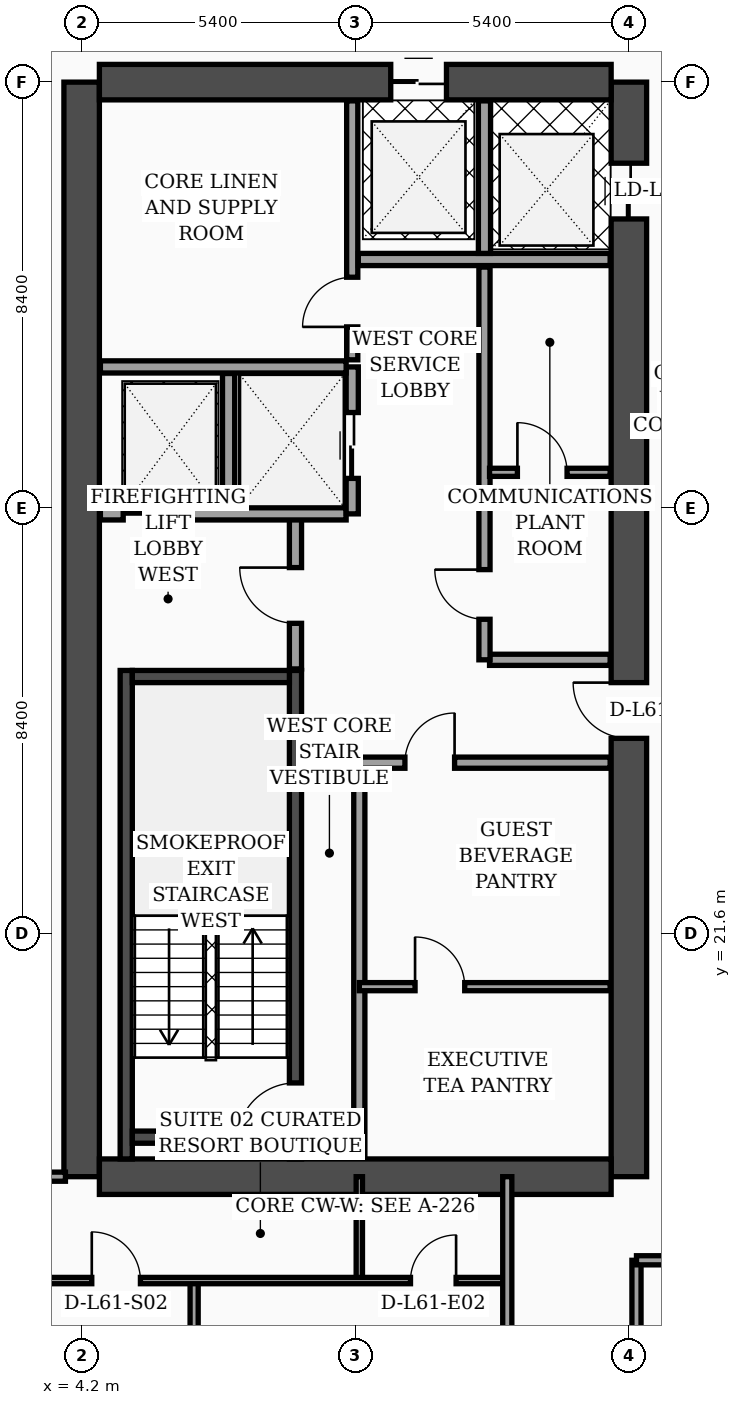
"""IFC4 building model, lengths in metres.
Left out: names, types, materials, properties, quantities, classifications, styles, units other than length and angle.
Written with IfcOpenShell. Run it as: python <this file> out.ifc"""

import sys

from ifc_helpers import new_model, si_unit, direction, frame, frame_2d, origin, place, context, subcontext, project, spatial, rectangle, extrude, element, fill, save


model = new_model("IFC4")
c1 = context("Model", 3, precision=1e-05, world=origin(), true_north=direction((0.0, 1.0)))
c2 = subcontext(c1, "Body", "Model", "MODEL_VIEW")
j1 = project(units=[si_unit("LENGTHUNIT", "METRE"), si_unit("PLANEANGLEUNIT", "RADIAN")], contexts=[c1])
p1 = place(None, origin())
s1 = spatial("IfcSite", under=j1, at=p1, CompositionType="ELEMENT")
p2 = place(p1, origin())
s2 = spatial("IfcBuilding", under=s1, at=p2, CompositionType="ELEMENT")
p3 = place(p2, frame((0.0, 0.0, 247.6)))
s3 = spatial("IfcBuildingStorey", under=s2, at=p3, CompositionType="ELEMENT", Elevation=247.6)
p4 = place(p3, frame((4.2, 16.8, 0.0), z_axis=(0.0, 0.0, 1.0), x_axis=(0.0, 1.0, 0.0)))
e1 = element("IfcWall", 1, at=p4, inside=s3, PredefinedType="SHEAR", context=c2, shape_type="SweptSolid", body=[
    extrude(rectangle(XDim=21.6, YDim=0.7, at=frame_2d((10.8, 0.0))), origin(), (0.0, 0.0, 1.0), 3.56),
])
p5 = place(p3, frame((15.0, 16.8, 0.0), z_axis=(0.0, 0.0, 1.0), x_axis=(0.0, 1.0, 0.0)))
e2 = element("IfcWall", 2, at=p5, inside=s3, PredefinedType="SHEAR", context=c2, shape_type="SweptSolid", body=[
    extrude(rectangle(XDim=21.6, YDim=0.7, at=frame_2d((10.8, 0.0))), origin(), (0.0, 0.0, 1.0), 3.56),
])
p6 = place(p5, frame((8.65, 0.0, 0.0)))
e3 = element("IfcOpeningElement", 3, at=p6, cuts=e2, PredefinedType="OPENING", context=c2, shape_type="SweptSolid", body=[
    extrude(rectangle(XDim=1.1, YDim=2.2, at=frame_2d((0.55, 1.1))), frame((0.0, 0.36, 0.0), z_axis=(0.0, -1.0, 0.0), x_axis=(1.0, 0.0, 0.0)), (0.0, 0.0, 1.0), 0.72),
])
p7 = place(p5, frame((18.9, 0.0, 0.0)))
e4 = element("IfcOpeningElement", 4, at=p7, cuts=e2, PredefinedType="OPENING", context=c2, shape_type="SweptSolid", body=[
    extrude(rectangle(XDim=1.1, YDim=2.2, at=frame_2d((0.55, 1.1))), frame((0.0, 0.36, 0.0), z_axis=(0.0, -1.0, 0.0), x_axis=(1.0, 0.0, 0.0)), (0.0, 0.0, 1.0), 0.72),
])
p8 = place(p3, frame((4.55, 38.4, 0.0), z_axis=(0.0, 0.0, 1.0), x_axis=(1.0, 0.0, 0.0)))
e5 = element("IfcWall", 5, at=p8, inside=s3, PredefinedType="SHEAR", context=c2, shape_type="SweptSolid", body=[
    extrude(rectangle(XDim=10.1, YDim=0.7, at=frame_2d((5.05, 0.0))), origin(), (0.0, 0.0, 1.0), 3.56),
])
p9 = place(p8, frame((5.75, 0.0, 0.0)))
e6 = element("IfcOpeningElement", 6, at=p9, cuts=e5, PredefinedType="OPENING", context=c2, shape_type="SweptSolid", body=[
    extrude(rectangle(XDim=1.1, YDim=2.2, at=frame_2d((0.55, 1.1))), frame((0.0, 0.36, 0.0), z_axis=(0.0, -1.0, 0.0), x_axis=(1.0, 0.0, 0.0)), (0.0, 0.0, 1.0), 0.72),
])
p10 = place(p3, frame((4.55, 16.8, 0.0), z_axis=(0.0, 0.0, 1.0), x_axis=(1.0, 0.0, 0.0)))
e7 = element("IfcWall", 7, at=p10, inside=s3, PredefinedType="SHEAR", context=c2, shape_type="SweptSolid", body=[
    extrude(rectangle(XDim=10.1, YDim=0.7, at=frame_2d((5.05, 0.0))), origin(), (0.0, 0.0, 1.0), 3.56),
])
p11 = place(p3, frame((5.08, 17.15, 0.0), z_axis=(0.0, 0.0, 1.0), x_axis=(0.0, 1.0, 0.0)))
e8 = element("IfcWall", 8, at=p11, inside=s3, PredefinedType="SOLIDWALL", context=c2, shape_type="SweptSolid", body=[
    extrude(rectangle(XDim=9.64, YDim=0.24, at=frame_2d((4.82, 0.0))), origin(), (0.0, 0.0, 1.0), 3.56),
])
p12 = place(p3, frame((8.42, 17.15, 0.0), z_axis=(0.0, 0.0, 1.0), x_axis=(0.0, 1.0, 0.0)))
e9 = element("IfcWall", 9, at=p12, inside=s3, PredefinedType="SOLIDWALL", context=c2, shape_type="SweptSolid", body=[
    extrude(rectangle(XDim=9.64, YDim=0.24, at=frame_2d((4.82, 0.0))), origin(), (0.0, 0.0, 1.0), 3.56),
])
p13 = place(p12, frame((0.35, 0.0, 0.0)))
e10 = element("IfcOpeningElement", 10, at=p13, cuts=e9, PredefinedType="OPENING", context=c2, shape_type="SweptSolid", body=[
    extrude(rectangle(XDim=1.15, YDim=2.2, at=frame_2d((0.575, 1.1))), frame((0.0, 0.13, 0.0), z_axis=(0.0, -1.0, 0.0), x_axis=(1.0, 0.0, 0.0)), (0.0, 0.0, 1.0), 0.26),
])
for number, where, z_axis, x_axis in (
    (11, (5.2, 17.58, 0.0), (0.0, 0.0, 1.0), (1.0, 0.0, 0.0)),
    (12, (5.2, 26.67, 0.0), (0.0, 0.0, 1.0), (1.0, 0.0, 0.0)),
):
    element("IfcWall", number, at=place(p3, frame(where, z_axis=z_axis, x_axis=x_axis)), inside=s3, PredefinedType="SOLIDWALL", context=c2, shape_type="SweptSolid", body=[
        extrude(rectangle(XDim=3.1, YDim=0.24, at=frame_2d((1.55, 0.0))), origin(), (0.0, 0.0, 1.0), 3.56),
    ])
p14 = place(p3, frame((8.42, 26.82, 0.0), z_axis=(0.0, 0.0, 1.0), x_axis=(0.0, 1.0, 0.0)))
e13 = element("IfcWall", 13, at=p14, inside=s3, PredefinedType="SOLIDWALL", context=c2, shape_type="SweptSolid", body=[
    extrude(rectangle(XDim=3.0, YDim=0.24, at=frame_2d((1.5, 0.0))), origin(), (0.0, 0.0, 1.0), 3.56),
])
p15 = place(p14, frame((0.9, 0.0, 0.0)))
e14 = element("IfcOpeningElement", 14, at=p15, cuts=e13, PredefinedType="OPENING", context=c2, shape_type="SweptSolid", body=[
    extrude(rectangle(XDim=1.1, YDim=2.2, at=frame_2d((0.55, 1.1))), frame((0.0, 0.13, 0.0), z_axis=(0.0, -1.0, 0.0), x_axis=(1.0, 0.0, 0.0)), (0.0, 0.0, 1.0), 0.26),
])
p16 = place(p3, frame((4.57, 29.88, 0.0), z_axis=(0.0, 0.0, 1.0), x_axis=(1.0, 0.0, 0.0)))
e15 = element("IfcWall", 15, at=p16, inside=s3, PredefinedType="SOLIDWALL", context=c2, shape_type="SweptSolid", body=[
    extrude(rectangle(XDim=4.85, YDim=0.24, at=frame_2d((2.425, 0.0))), origin(), (0.0, 0.0, 1.0), 3.56),
])
p17 = place(p16, frame((0.45, 0.0, 0.0)))
e16 = element("IfcOpeningElement", 16, at=p17, cuts=e15, PredefinedType="OPENING", context=c2, shape_type="SweptSolid", body=[
    extrude(rectangle(XDim=1.3, YDim=2.35, at=frame_2d((0.65, 1.175))), frame((0.0, 0.13, 0.0), z_axis=(0.0, -1.0, 0.0), x_axis=(1.0, 0.0, 0.0)), (0.0, 0.0, 1.0), 0.26),
])
p18 = place(p3, frame((7.1, 30.02, 0.0), z_axis=(0.0, 0.0, 1.0), x_axis=(0.0, 1.0, 0.0)))
e17 = element("IfcWall", 17, at=p18, inside=s3, PredefinedType="SOLIDWALL", context=c2, shape_type="SweptSolid", body=[
    extrude(rectangle(XDim=2.63, YDim=0.24, at=frame_2d((1.315, 0.0))), origin(), (0.0, 0.0, 1.0), 3.56),
])
p19 = place(p3, frame((9.54, 29.88, 0.0), z_axis=(0.0, 0.0, 1.0), x_axis=(0.0, 1.0, 0.0)))
e18 = element("IfcWall", 18, at=p19, inside=s3, PredefinedType="SOLIDWALL", context=c2, shape_type="SweptSolid", body=[
    extrude(rectangle(XDim=2.9, YDim=0.24, at=frame_2d((1.45, 0.0))), origin(), (0.0, 0.0, 1.0), 3.56),
])
p20 = place(p19, frame((0.7, 0.0, 0.0)))
e19 = element("IfcOpeningElement", 19, at=p20, cuts=e18, PredefinedType="OPENING", context=c2, shape_type="SweptSolid", body=[
    extrude(rectangle(XDim=1.3, YDim=2.35, at=frame_2d((0.65, 1.175))), frame((0.0, 0.13, 0.0), z_axis=(0.0, -1.0, 0.0), x_axis=(1.0, 0.0, 0.0)), (0.0, 0.0, 1.0), 0.26),
])
p21 = place(p3, frame((4.57, 32.78, 0.0), z_axis=(0.0, 0.0, 1.0), x_axis=(1.0, 0.0, 0.0)))
e20 = element("IfcWall", 20, at=p21, inside=s3, PredefinedType="SOLIDWALL", context=c2, shape_type="SweptSolid", body=[
    extrude(rectangle(XDim=4.85, YDim=0.24, at=frame_2d((2.425, 0.0))), origin(), (0.0, 0.0, 1.0), 3.19),
])
p22 = place(p3, frame((9.68, 17.17, 0.0), z_axis=(0.0, 0.0, 1.0), x_axis=(0.0, 1.0, 0.0)))
e21 = element("IfcWall", 21, at=p22, inside=s3, PredefinedType="SOLIDWALL", context=c2, shape_type="SweptSolid", body=[
    extrude(rectangle(XDim=7.83, YDim=0.22, at=frame_2d((3.915, 0.0))), origin(), (0.0, 0.0, 1.0), 3.56),
])
p23 = place(p3, frame((9.54, 32.92, 0.0), z_axis=(0.0, 0.0, 1.0), x_axis=(0.0, 1.0, 0.0)))
e22 = element("IfcWall", 22, at=p23, inside=s3, PredefinedType="SOLIDWALL", context=c2, shape_type="SweptSolid", body=[
    extrude(rectangle(XDim=5.11, YDim=0.22, at=frame_2d((2.555, 0.0))), origin(), (0.0, 0.0, 1.0), 3.56),
])
p24 = place(p23, frame((0.65, 0.0, 0.0)))
e23 = element("IfcOpeningElement", 23, at=p24, cuts=e22, PredefinedType="OPENING", context=c2, shape_type="SweptSolid", body=[
    extrude(rectangle(XDim=0.98, YDim=2.15, at=frame_2d((0.49, 1.075))), frame((0.0, 0.12, 0.0), z_axis=(0.0, -1.0, 0.0), x_axis=(1.0, 0.0, 0.0)), (0.0, 0.0, 1.0), 0.24),
])
p25 = place(p3, frame((9.68, 20.55, 0.0), z_axis=(0.0, 0.0, 1.0), x_axis=(1.0, 0.0, 0.0)))
e24 = element("IfcWall", 24, at=p25, inside=s3, PredefinedType="PARTITIONING", context=c2, shape_type="SweptSolid", body=[
    extrude(rectangle(XDim=4.95, YDim=0.16, at=frame_2d((2.475, 0.0))), origin(), (0.0, 0.0, 1.0), 3.56),
])
p26 = place(p25, frame((1.1, 0.0, 0.0)))
e25 = element("IfcOpeningElement", 25, at=p26, cuts=e24, PredefinedType="OPENING", context=c2, shape_type="SweptSolid", body=[
    extrude(rectangle(XDim=0.98, YDim=2.15, at=frame_2d((0.49, 1.075))), frame((0.0, 0.09, 0.0), z_axis=(0.0, -1.0, 0.0), x_axis=(1.0, 0.0, 0.0)), (0.0, 0.0, 1.0), 0.18),
])
p27 = place(p3, frame((9.68, 24.97, 0.0), z_axis=(0.0, 0.0, 1.0), x_axis=(1.0, 0.0, 0.0)))
e26 = element("IfcWall", 26, at=p27, inside=s3, PredefinedType="SOLIDWALL", context=c2, shape_type="SweptSolid", body=[
    extrude(rectangle(XDim=4.95, YDim=0.22, at=frame_2d((2.475, 0.0))), origin(), (0.0, 0.0, 1.0), 2.99),
])
p28 = place(p27, frame((0.9, 0.0, 0.0)))
e27 = element("IfcOpeningElement", 27, at=p28, cuts=e26, PredefinedType="OPENING", context=c2, shape_type="SweptSolid", body=[
    extrude(rectangle(XDim=0.98, YDim=2.15, at=frame_2d((0.49, 1.075))), frame((0.0, 0.12, 0.0), z_axis=(0.0, -1.0, 0.0), x_axis=(1.0, 0.0, 0.0)), (0.0, 0.0, 1.0), 0.24),
])
p29 = place(p3, frame((12.25, 27.0, 0.0), z_axis=(0.0, 0.0, 1.0), x_axis=(1.0, 0.0, 0.0)))
e28 = element("IfcWall", 28, at=p29, inside=s3, PredefinedType="SOLIDWALL", context=c2, shape_type="SweptSolid", body=[
    extrude(rectangle(XDim=2.38, YDim=0.22, at=frame_2d((1.19, 0.0))), origin(), (0.0, 0.0, 1.0), 3.56),
])
p30 = place(p3, frame((12.15, 27.0, 0.0), z_axis=(0.0, 0.0, 1.0), x_axis=(0.0, 1.0, 0.0)))
e29 = element("IfcWall", 29, at=p30, inside=s3, PredefinedType="SOLIDWALL", context=c2, shape_type="SweptSolid", body=[
    extrude(rectangle(XDim=7.75, YDim=0.22, at=frame_2d((3.875, 0.0))), origin(), (0.0, 0.0, 1.0), 3.56),
])
p31 = place(p30, frame((0.8, 0.0, 0.0)))
e30 = element("IfcOpeningElement", 30, at=p31, cuts=e29, PredefinedType="OPENING", context=c2, shape_type="SweptSolid", body=[
    extrude(rectangle(XDim=0.98, YDim=2.15, at=frame_2d((0.49, 1.075))), frame((0.0, 0.12, 0.0), z_axis=(0.0, -1.0, 0.0), x_axis=(1.0, 0.0, 0.0)), (0.0, 0.0, 1.0), 0.24),
])
p32 = place(p3, frame((12.25, 30.7, 0.0), z_axis=(0.0, 0.0, 1.0), x_axis=(1.0, 0.0, 0.0)))
e31 = element("IfcWall", 31, at=p32, inside=s3, PredefinedType="PARTITIONING", context=c2, shape_type="SweptSolid", body=[
    extrude(rectangle(XDim=2.38, YDim=0.16, at=frame_2d((1.19, 0.0))), origin(), (0.0, 0.0, 1.0), 3.56),
])
p33 = place(p32, frame((0.55, 0.0, 0.0)))
e32 = element("IfcOpeningElement", 32, at=p33, cuts=e31, PredefinedType="OPENING", context=c2, shape_type="SweptSolid", body=[
    extrude(rectangle(XDim=0.98, YDim=2.15, at=frame_2d((0.49, 1.075))), frame((0.0, 0.09, 0.0), z_axis=(0.0, -1.0, 0.0), x_axis=(1.0, 0.0, 0.0)), (0.0, 0.0, 1.0), 0.18),
])
p34 = place(p3, frame((9.66, 34.9, 0.0), z_axis=(0.0, 0.0, 1.0), x_axis=(1.0, 0.0, 0.0)))
e33 = element("IfcWall", 33, at=p34, inside=s3, PredefinedType="SOLIDWALL", context=c2, shape_type="SweptSolid", body=[
    extrude(rectangle(XDim=4.97, YDim=0.24, at=frame_2d((2.485, 0.0))), origin(), (0.0, 0.0, 1.0), 3.56),
])
p35 = place(p3, frame((12.15, 35.02, 0.0), z_axis=(0.0, 0.0, 1.0), x_axis=(0.0, 1.0, 0.0)))
e34 = element("IfcWall", 34, at=p35, inside=s3, PredefinedType="SOLIDWALL", context=c2, shape_type="SweptSolid", body=[
    extrude(rectangle(XDim=3.01, YDim=0.24, at=frame_2d((1.505, 0.0))), origin(), (0.0, 0.0, 1.0), 3.56),
])
p36 = place(p3, frame((0.08, 16.8, 0.0), z_axis=(0.0, 0.0, 1.0), x_axis=(1.0, 0.0, 0.0)))
e35 = element("IfcWall", 35, at=p36, inside=s3, PredefinedType="PARTITIONING", context=c2, shape_type="SweptSolid", body=[
    extrude(rectangle(XDim=3.8, YDim=0.18, at=frame_2d((1.9, 0.0))), origin(), (0.0, 0.0, 1.0), 2.99),
])
p37 = place(p3, frame((9.68, 14.75, 0.0), z_axis=(0.0, 0.0, 1.0), x_axis=(0.0, 1.0, 0.0)))
e36 = element("IfcWall", 36, at=p37, inside=s3, PredefinedType="PARTITIONING", context=c2, shape_type="SweptSolid", body=[
    extrude(rectangle(XDim=2.05, YDim=0.125, at=frame_2d((1.025, 0.0))), origin(), (0.0, 0.0, 1.0), 3.56),
])
p38 = place(p3, frame((6.42, 10.2, 0.0), z_axis=(0.0, 0.0, 1.0), x_axis=(0.0, 1.0, 0.0)))
e37 = element("IfcWall", 37, at=p38, inside=s3, PredefinedType="PARTITIONING", context=c2, shape_type="SweptSolid", body=[
    extrude(rectangle(XDim=4.55, YDim=0.16, at=frame_2d((2.275, 0.0))), origin(), (0.0, 0.0, 1.0), 3.14),
])
p39 = place(p38, frame((1.8, 0.0, 0.0)))
e38 = element("IfcOpeningElement", 38, at=p39, cuts=e37, PredefinedType="OPENING", context=c2, shape_type="SweptSolid", body=[
    extrude(rectangle(XDim=0.96, YDim=2.2, at=frame_2d((0.48, 1.1))), frame((0.0, 0.09, 0.0), z_axis=(0.0, -1.0, 0.0), x_axis=(1.0, 0.0, 0.0)), (0.0, 0.0, 1.0), 0.18),
])
p40 = place(p3, frame((0.08, 14.75, 0.0), z_axis=(0.0, 0.0, 1.0), x_axis=(1.0, 0.0, 0.0)))
e39 = element("IfcWall", 39, at=p40, inside=s3, PredefinedType="PARTITIONING", context=c2, shape_type="SweptSolid", body=[
    extrude(rectangle(XDim=12.52, YDim=0.125, at=frame_2d((6.26, 0.0))), origin(), (0.0, 0.0, 1.0), 2.99),
])
p41 = place(p40, frame((4.32, 0.0, 0.0)))
e40 = element("IfcOpeningElement", 40, at=p41, cuts=e39, PredefinedType="OPENING", context=c2, shape_type="SweptSolid", body=[
    extrude(rectangle(XDim=0.96, YDim=2.2, at=frame_2d((0.48, 1.1))), frame((0.0, 0.073, 0.0), z_axis=(0.0, -1.0, 0.0), x_axis=(1.0, 0.0, 0.0)), (0.0, 0.0, 1.0), 0.145),
])
p42 = place(p40, frame((10.61, 0.0, 0.0)))
e41 = element("IfcOpeningElement", 41, at=p42, cuts=e39, PredefinedType="OPENING", context=c2, shape_type="SweptSolid", body=[
    extrude(rectangle(XDim=0.9, YDim=2.15, at=frame_2d((0.45, 1.075))), frame((0.0, 0.073, 0.0), z_axis=(0.0, -1.0, 0.0), x_axis=(1.0, 0.0, 0.0)), (0.0, 0.0, 1.0), 0.145),
])
p43 = place(p3, frame((12.6, 2.44, 0.0), z_axis=(0.0, 0.0, 1.0), x_axis=(0.0, 1.0, 0.0)))
e42 = element("IfcWall", 42, at=p43, inside=s3, PredefinedType="PARTITIONING", context=c2, shape_type="SweptSolid", body=[
    extrude(rectangle(XDim=14.36, YDim=0.18, at=frame_2d((7.18, 0.0))), origin(), (0.0, 0.0, 1.0), 2.99),
])
p44 = place(p43, frame((3.01, 0.0, 0.0)))
e43 = element("IfcOpeningElement", 43, at=p44, cuts=e42, PredefinedType="OPENING", context=c2, shape_type="SweptSolid", body=[
    extrude(rectangle(XDim=1.02, YDim=2.2, at=frame_2d((0.51, 1.1))), frame((0.0, 0.1, 0.0), z_axis=(0.0, -1.0, 0.0), x_axis=(1.0, 0.0, 0.0)), (0.0, 0.0, 1.0), 0.2),
])
p45 = place(p43, frame((9.52, 0.0, 0.0)))
e44 = element("IfcOpeningElement", 44, at=p45, cuts=e42, PredefinedType="OPENING", context=c2, shape_type="SweptSolid", body=[
    extrude(rectangle(XDim=1.02, YDim=2.2, at=frame_2d((0.51, 1.1))), frame((0.0, 0.1, 0.0), z_axis=(0.0, -1.0, 0.0), x_axis=(1.0, 0.0, 0.0)), (0.0, 0.0, 1.0), 0.2),
])
p46 = place(p3, frame((15.15, 2.44, 0.0), z_axis=(0.0, 0.0, 1.0), x_axis=(0.0, 1.0, 0.0)))
e45 = element("IfcWall", 45, at=p46, inside=s3, PredefinedType="PARTITIONING", context=c2, shape_type="SweptSolid", body=[
    extrude(rectangle(XDim=12.71, YDim=0.18, at=frame_2d((6.355, 0.0))), origin(), (0.0, 0.0, 1.0), 3.09),
])
p47 = place(p3, frame((15.15, 15.15, 0.0), z_axis=(0.0, 0.0, 1.0), x_axis=(1.0, 0.0, 0.0)))
e46 = element("IfcWall", 46, at=p47, inside=s3, PredefinedType="PARTITIONING", context=c2, shape_type="SweptSolid", body=[
    extrude(rectangle(XDim=6.45, YDim=0.18, at=frame_2d((3.225, 0.0))), origin(), (0.0, 0.0, 1.0), 2.59),
])
p48 = place(p47, frame((1.74, 0.0, 0.0)))
e47 = element("IfcOpeningElement", 47, at=p48, cuts=e46, PredefinedType="OPENING", context=c2, shape_type="SweptSolid", body=[
    extrude(rectangle(XDim=1.02, YDim=2.2, at=frame_2d((0.51, 1.1))), frame((0.0, 0.1, 0.0), z_axis=(0.0, -1.0, 0.0), x_axis=(1.0, 0.0, 0.0)), (0.0, 0.0, 1.0), 0.2),
])
p49 = place(p15, origin())
e48 = element("IfcDoor", 48, at=p49, inside=s3, OperationType="SINGLE_SWING_RIGHT", PredefinedType="DOOR", context=c2, shape_type="SweptSolid", body=[
    extrude(rectangle(XDim=1.1, YDim=2.2, at=frame_2d((0.55, 1.1))), frame((0.0, 0.025, 0.0), z_axis=(0.0, -1.0, 0.0), x_axis=(1.0, 0.0, 0.0)), (0.0, 0.0, 1.0), 0.05),
])
fill(e14, e48)
p50 = place(p17, origin())
e49 = element("IfcDoor", 49, at=p50, inside=s3, OperationType="DOUBLE_DOOR_SLIDING", PredefinedType="DOOR", context=c2, shape_type="SweptSolid", body=[
    extrude(rectangle(XDim=1.3, YDim=2.35, at=frame_2d((0.65, 1.175))), frame((0.0, 0.025, 0.0), z_axis=(0.0, -1.0, 0.0), x_axis=(1.0, 0.0, 0.0)), (0.0, 0.0, 1.0), 0.05),
])
fill(e16, e49)
p51 = place(p20, origin())
e50 = element("IfcDoor", 50, at=p51, inside=s3, OperationType="DOUBLE_DOOR_SLIDING", PredefinedType="DOOR", context=c2, shape_type="SweptSolid", body=[
    extrude(rectangle(XDim=1.3, YDim=2.35, at=frame_2d((0.65, 1.175))), frame((0.0, 0.025, 0.0), z_axis=(0.0, -1.0, 0.0), x_axis=(1.0, 0.0, 0.0)), (0.0, 0.0, 1.0), 0.05),
])
fill(e19, e50)
p52 = place(p24, origin())
e51 = element("IfcDoor", 51, at=p52, inside=s3, OperationType="SINGLE_SWING_LEFT", PredefinedType="DOOR", context=c2, shape_type="SweptSolid", body=[
    extrude(rectangle(XDim=0.98, YDim=2.15, at=frame_2d((0.49, 1.075))), frame((0.0, 0.025, 0.0), z_axis=(0.0, -1.0, 0.0), x_axis=(1.0, 0.0, 0.0)), (0.0, 0.0, 1.0), 0.05),
])
fill(e23, e51)
p53 = place(p26, origin())
e52 = element("IfcDoor", 52, at=p53, inside=s3, OperationType="SINGLE_SWING_LEFT", PredefinedType="DOOR", context=c2, shape_type="SweptSolid", body=[
    extrude(rectangle(XDim=0.98, YDim=2.15, at=frame_2d((0.49, 1.075))), frame((0.0, 0.025, 0.0), z_axis=(0.0, -1.0, 0.0), x_axis=(1.0, 0.0, 0.0)), (0.0, 0.0, 1.0), 0.05),
])
fill(e25, e52)
p54 = place(p28, origin())
e53 = element("IfcDoor", 53, at=p54, inside=s3, OperationType="SINGLE_SWING_RIGHT", PredefinedType="DOOR", context=c2, shape_type="SweptSolid", body=[
    extrude(rectangle(XDim=0.98, YDim=2.15, at=frame_2d((0.49, 1.075))), frame((0.0, 0.025, 0.0), z_axis=(0.0, -1.0, 0.0), x_axis=(1.0, 0.0, 0.0)), (0.0, 0.0, 1.0), 0.05),
])
fill(e27, e53)
p55 = place(p31, origin())
e54 = element("IfcDoor", 54, at=p55, inside=s3, OperationType="SINGLE_SWING_RIGHT", PredefinedType="DOOR", context=c2, shape_type="SweptSolid", body=[
    extrude(rectangle(XDim=0.98, YDim=2.15, at=frame_2d((0.49, 1.075))), frame((0.0, 0.025, 0.0), z_axis=(0.0, -1.0, 0.0), x_axis=(1.0, 0.0, 0.0)), (0.0, 0.0, 1.0), 0.05),
])
fill(e30, e54)
p56 = place(p33, origin())
e55 = element("IfcDoor", 55, at=p56, inside=s3, OperationType="SINGLE_SWING_LEFT", PredefinedType="DOOR", context=c2, shape_type="SweptSolid", body=[
    extrude(rectangle(XDim=0.98, YDim=2.15, at=frame_2d((0.49, 1.075))), frame((0.0, 0.025, 0.0), z_axis=(0.0, -1.0, 0.0), x_axis=(1.0, 0.0, 0.0)), (0.0, 0.0, 1.0), 0.05),
])
fill(e32, e55)
p57 = place(p41, origin())
e56 = element("IfcDoor", 56, at=p57, inside=s3, OperationType="SINGLE_SWING_LEFT", PredefinedType="DOOR", context=c2, shape_type="SweptSolid", body=[
    extrude(rectangle(XDim=0.96, YDim=2.2, at=frame_2d((0.48, 1.1))), frame((0.0, 0.025, 0.0), z_axis=(0.0, -1.0, 0.0), x_axis=(1.0, 0.0, 0.0)), (0.0, 0.0, 1.0), 0.05),
])
fill(e40, e56)
p58 = place(p42, origin())
e57 = element("IfcDoor", 57, at=p58, inside=s3, OperationType="SINGLE_SWING_RIGHT", PredefinedType="DOOR", context=c2, shape_type="SweptSolid", body=[
    extrude(rectangle(XDim=0.9, YDim=2.15, at=frame_2d((0.45, 1.075))), frame((0.0, 0.025, 0.0), z_axis=(0.0, -1.0, 0.0), x_axis=(1.0, 0.0, 0.0)), (0.0, 0.0, 1.0), 0.05),
])
fill(e41, e57)
p59 = place(p13, origin())
e58 = element("IfcDoor", 58, at=p59, inside=s3, OperationType="SINGLE_SWING_LEFT", PredefinedType="DOOR", context=c2, shape_type="SweptSolid", body=[
    extrude(rectangle(XDim=1.15, YDim=2.2, at=frame_2d((0.575, 1.1))), frame((0.0, 0.025, 0.0), z_axis=(0.0, -1.0, 0.0), x_axis=(1.0, 0.0, 0.0)), (0.0, 0.0, 1.0), 0.05),
])
fill(e10, e58)
p60 = place(p6, origin())
e59 = element("IfcDoor", 59, at=p60, inside=s3, OperationType="SINGLE_SWING_RIGHT", PredefinedType="DOOR", context=c2, shape_type="SweptSolid", body=[
    extrude(rectangle(XDim=1.1, YDim=2.2, at=frame_2d((0.55, 1.1))), frame((0.0, 0.025, 0.0), z_axis=(0.0, -1.0, 0.0), x_axis=(1.0, 0.0, 0.0)), (0.0, 0.0, 1.0), 0.05),
])
fill(e3, e59)
p61 = place(p7, origin())
e60 = element("IfcDoor", 60, at=p61, inside=s3, OperationType="DOUBLE_DOOR_SLIDING", PredefinedType="DOOR", context=c2, shape_type="SweptSolid", body=[
    extrude(rectangle(XDim=1.1, YDim=2.2, at=frame_2d((0.55, 1.1))), frame((0.0, 0.025, 0.0), z_axis=(0.0, -1.0, 0.0), x_axis=(1.0, 0.0, 0.0)), (0.0, 0.0, 1.0), 0.05),
])
fill(e4, e60)
p62 = place(p9, origin())
e61 = element("IfcDoor", 61, at=p62, inside=s3, OperationType="DOUBLE_DOOR_SLIDING", PredefinedType="DOOR", context=c2, shape_type="SweptSolid", body=[
    extrude(rectangle(XDim=1.1, YDim=2.2, at=frame_2d((0.55, 1.1))), frame((0.0, 0.025, 0.0), z_axis=(0.0, -1.0, 0.0), x_axis=(1.0, 0.0, 0.0)), (0.0, 0.0, 1.0), 0.05),
])
fill(e6, e61)
save(model, sys.argv[1])
